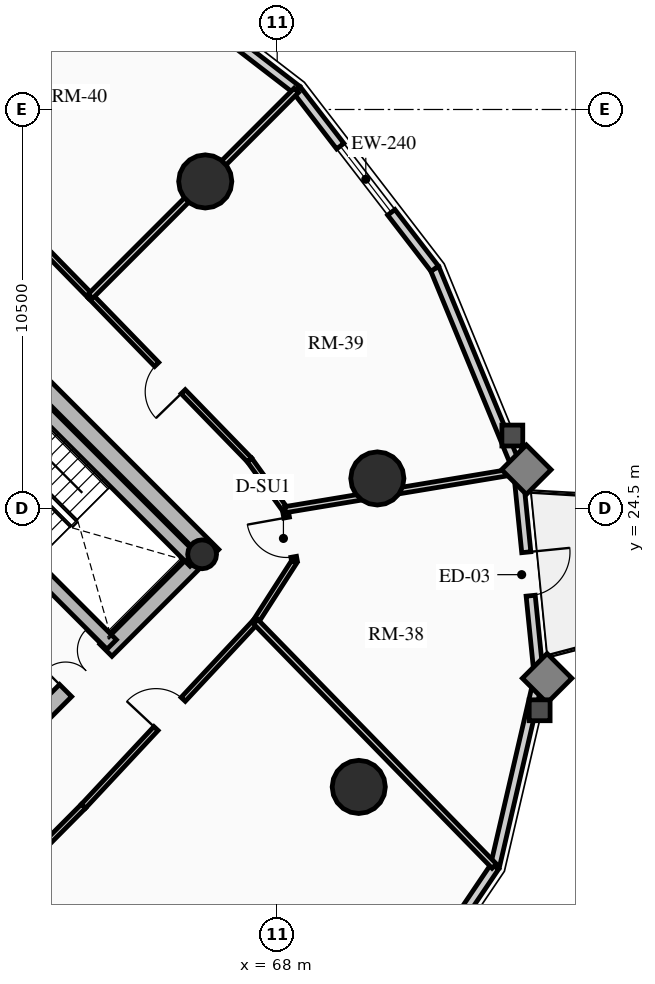
"""IFC4 building model, lengths in metres.
Left out: names, types, materials, properties, quantities, classifications, styles, units other than length and angle.
Written with IfcOpenShell. Run it as: python <this file> out.ifc"""

import sys

from ifc_helpers import new_model, si_unit, direction, frame, frame_2d, origin, origin_2d, place, context, subcontext, project, spatial, rectangle, circle, hollow_circle, extrude, source, transform, mapped, element, fill, save


model = new_model("IFC4")
c1 = context("Model", 3, precision=1e-05, world=origin(), true_north=direction((0.0, 1.0)))
c2 = subcontext(c1, "Body", "Model", "MODEL_VIEW")
j1 = project(units=[si_unit("LENGTHUNIT", "METRE"), si_unit("PLANEANGLEUNIT", "RADIAN")], contexts=[c1])
p1 = place(None, origin())
s1 = spatial("IfcSite", under=j1, at=p1, CompositionType="ELEMENT")
p2 = place(p1, origin())
s2 = spatial("IfcBuilding", under=s1, at=p2, CompositionType="ELEMENT")
p3 = place(p2, frame((0.0, 0.0, 84.7)))
s3 = spatial("IfcBuildingStorey", under=s2, at=p3, CompositionType="ELEMENT", Elevation=84.7)
p4 = place(p3, frame((66.303, 23.263, 0.0), z_axis=(0.0, 0.0, 1.0), x_axis=(-0.707106781187, 0.707106781187, 0.0)))
e1 = element("IfcWall", 1, at=p4, inside=s3, PredefinedType="SHEAR", context=c2, shape_type="SweptSolid", body=[
    extrude(rectangle(XDim=14.2, YDim=0.45, at=frame_2d((7.1, 0.0))), origin(), (0.0, 0.0, 1.0), 2.91),
])
p5 = place(p3, frame((58.578, 15.856, 0.0), z_axis=(0.0, 0.0, 1.0), x_axis=(0.707106781187, 0.707106781187, 0.0)))
e2 = element("IfcWall", 2, at=p5, inside=s3, PredefinedType="SHEAR", context=c2, shape_type="SweptSolid", body=[
    extrude(rectangle(XDim=10.7, YDim=0.45, at=frame_2d((5.35, 0.0))), origin(), (0.0, 0.0, 1.0), 2.91),
])
m1 = source(origin(), c2, "Body", "SweptSolid", [
    extrude(rectangle(XDim=1.5, YDim=2.02, at=frame_2d((0.75, 1.01))), frame((0.0, 0.235, 0.0), z_axis=(0.0, -1.0, 0.0), x_axis=(1.0, 0.0, 0.0)), (0.0, 0.0, 1.0), 0.47),
])
p6 = place(p5, frame((5.45, 0.0, 0.0)))
e3 = element("IfcOpeningElement", 3, at=p6, cuts=e2, PredefinedType="OPENING", context=c2, shape_type="MappedRepresentation", body=[
    mapped(m1, transform((0.0, 0.0, 0.0), x_axis=(1.0, 0.0, 0.0), y_axis=(0.0, 1.0, 0.0), z_axis=(0.0, 0.0, 1.0), scale=1.0)),
])
p7 = place(p3, frame((63.645, 20.922, 0.0), z_axis=(0.0, 0.0, 1.0), x_axis=(-0.707106781187, 0.707106781187, 0.0)))
e4 = element("IfcWall", 4, at=p7, inside=s3, PredefinedType="SHEAR", context=c2, shape_type="SweptSolid", body=[
    extrude(rectangle(XDim=13.75, YDim=0.35, at=frame_2d((6.875, 0.0))), origin(), (0.0, 0.0, 1.0), 2.91),
])
m2 = source(origin(), c2, "Body", "SweptSolid", [
    extrude(rectangle(XDim=1.1, YDim=2.015, at=frame_2d((0.55, 1.007))), frame((0.0, 0.185, 0.0), z_axis=(0.0, -1.0, 0.0), x_axis=(1.0, 0.0, 0.0)), (0.0, 0.0, 1.0), 0.37),
])
p8 = place(p7, frame((10.0, 0.0, 0.0)))
e5 = element("IfcOpeningElement", 5, at=p8, cuts=e4, PredefinedType="OPENING", context=c2, shape_type="MappedRepresentation", body=[
    mapped(m2, transform((0.0, 0.0, 0.0), x_axis=(1.0, 0.0, 0.0), y_axis=(0.0, 1.0, 0.0), z_axis=(0.0, 0.0, 1.0), scale=1.0)),
])
p9 = place(p7, frame((12.0, 0.0, 0.0)))
e6 = element("IfcOpeningElement", 6, at=p9, cuts=e4, PredefinedType="OPENING", context=c2, shape_type="MappedRepresentation", body=[
    mapped(m2, transform((0.0, 0.0, 0.0), x_axis=(1.0, 0.0, 0.0), y_axis=(0.0, 1.0, 0.0), z_axis=(0.0, 0.0, 1.0), scale=1.0)),
])
m3 = source(origin(), c2, "Body", "SweptSolid", [
    extrude(rectangle(XDim=1.15, YDim=2.02, at=frame_2d((0.575, 1.01))), frame((0.0, 0.185, 0.0), z_axis=(0.0, -1.0, 0.0), x_axis=(1.0, 0.0, 0.0)), (0.0, 0.0, 1.0), 0.37),
])
p10 = place(p7, frame((5.305, 0.0, 0.0)))
e7 = element("IfcOpeningElement", 7, at=p10, cuts=e4, PredefinedType="OPENING", context=c2, shape_type="MappedRepresentation", body=[
    mapped(m3, transform((0.0, 0.0, 0.0), x_axis=(1.0, 0.0, 0.0), y_axis=(0.0, 1.0, 0.0), z_axis=(0.0, 0.0, 1.0), scale=1.0)),
])
p11 = place(p3, frame((65.83, 23.107, 0.0), z_axis=(0.0, 0.0, 1.0), x_axis=(-0.707088616009, 0.707124945897, 0.0)))
e8 = element("IfcWall", 8, at=p11, inside=s3, PredefinedType="SHEAR", context=c2, shape_type="SweptSolid", body=[
    extrude(rectangle(XDim=6.72, YDim=0.35, at=frame_2d((3.36, 0.0))), origin(), (0.0, 0.0, 1.0), 2.91),
])
p12 = place(p3, frame((66.024, 23.294, 0.0), z_axis=(0.0, 0.0, 1.0), x_axis=(0.707106781187, 0.707106781187, 0.0)))
e9 = element("IfcColumn", 9, at=p12, inside=s3, PredefinedType="COLUMN", context=c2, shape_type="SweptSolid", body=[
    extrude(hollow_circle(Radius=0.38, WallThickness=0.032, at=origin_2d()), origin(), (0.0, 0.0, 1.0), 2.91),
])
for number, where, z_axis, x_axis in (
    (10, (66.107, 33.107, 0.0), (0.0, 0.0, 1.0), (1.0, 0.0, 0.0)),
    (11, (70.146, 17.173, 0.0), (0.0, 0.0, 1.0), (1.0, 0.0, 0.0)),
    (12, (70.635, 25.291, 0.0), (0.0, 0.0, 1.0), (1.0, 0.0, 0.0)),
):
    element("IfcColumn", number, at=place(p3, frame(where, z_axis=z_axis, x_axis=x_axis)), inside=s3, PredefinedType="USERDEFINED", context=c2, shape_type="SweptSolid", body=[
        extrude(circle(Radius=0.7, at=origin_2d()), origin(), (0.0, 0.0, 1.0), 2.91),
    ])
p13 = place(p3, frame((63.811, 39.145, 0.0), z_axis=(0.0, 0.0, 1.0), x_axis=(0.791982052206, -0.61054437102, 0.0)))
e13 = element("IfcWall", 13, at=p13, inside=s3, PredefinedType="SOLIDWALL", context=c2, shape_type="SweptSolid", body=[
    extrude(rectangle(XDim=5.942, YDim=0.24, at=frame_2d((2.971, 0.0))), origin(), (0.0, 0.0, 1.0), 2.179),
])
p14 = place(p3, frame((73.729, 15.08, 0.0), z_axis=(0.0, 0.0, 1.0), x_axis=(-0.559572880421, -0.828781148131, 0.0)))
e14 = element("IfcWall", 14, at=p14, inside=s3, PredefinedType="SOLIDWALL", context=c2, shape_type="SweptSolid", body=[
    extrude(rectangle(XDim=4.905, YDim=0.24, at=frame_2d((2.452, 0.0))), origin(), (0.0, 0.0, 1.0), 2.179),
])
m4 = source(origin(), c2, "Body", "SweptSolid", [
    extrude(rectangle(XDim=1.9, YDim=1.35, at=frame_2d((0.95, 0.675))), frame((0.0, 0.13, 0.0), z_axis=(0.0, -1.0, 0.0), x_axis=(1.0, 0.0, 0.0)), (0.0, 0.0, 1.0), 0.26),
])
p15 = place(p14, frame((1.502, 0.0, 0.65)))
e15 = element("IfcOpeningElement", 15, at=p15, cuts=e14, PredefinedType="OPENING", context=c2, shape_type="MappedRepresentation", body=[
    mapped(m4, transform((0.0, 0.0, 0.0), x_axis=(1.0, 0.0, 0.0), y_axis=(0.0, 1.0, 0.0), z_axis=(0.0, 0.0, 1.0), scale=1.0)),
])
p16 = place(p3, frame((74.885, 20.067, 0.0), z_axis=(0.0, 0.0, 1.0), x_axis=(-0.225834725257, -0.974165631126, 0.0)))
e16 = element("IfcWall", 16, at=p16, inside=s3, PredefinedType="SOLIDWALL", context=c2, shape_type="SweptSolid", body=[
    extrude(rectangle(XDim=5.119, YDim=0.24, at=frame_2d((2.56, 0.0))), origin(), (0.0, 0.0, 1.0), 2.179),
])
p17 = place(p3, frame((74.339, 25.487, 0.0), z_axis=(0.0, 0.0, 1.0), x_axis=(0.10015591906, -0.994971754311, 0.0)))
e17 = element("IfcWall", 17, at=p17, inside=s3, PredefinedType="SOLIDWALL", context=c2, shape_type="SweptSolid", body=[
    extrude(rectangle(XDim=5.448, YDim=0.24, at=frame_2d((2.724, 0.0))), origin(), (0.0, 0.0, 1.0), 2.179),
])
m5 = source(origin(), c2, "Body", "SweptSolid", [
    extrude(rectangle(XDim=1.15, YDim=2.005, at=frame_2d((0.575, 1.002))), frame((0.0, 0.13, 0.0), z_axis=(0.0, -1.0, 0.0), x_axis=(1.0, 0.0, 0.0)), (0.0, 0.0, 1.0), 0.26),
])
p18 = place(p17, frame((2.149, 0.0, 0.0)))
e18 = element("IfcOpeningElement", 18, at=p18, cuts=e17, PredefinedType="OPENING", context=c2, shape_type="MappedRepresentation", body=[
    mapped(m5, transform((0.0, 0.0, 0.0), x_axis=(1.0, 0.0, 0.0), y_axis=(0.0, 1.0, 0.0), z_axis=(0.0, 0.0, 1.0), scale=1.0)),
])
p19 = place(p3, frame((72.145, 30.811, 0.0), z_axis=(0.0, 0.0, 1.0), x_axis=(0.381027003055, -0.924563909604, 0.0)))
e19 = element("IfcWall", 19, at=p19, inside=s3, PredefinedType="SOLIDWALL", context=c2, shape_type="SweptSolid", body=[
    extrude(rectangle(XDim=5.758, YDim=0.24, at=frame_2d((2.879, 0.0))), origin(), (0.0, 0.0, 1.0), 2.179),
])
p20 = place(p3, frame((68.517, 35.517, 0.0), z_axis=(0.0, 0.0, 1.0), x_axis=(0.61054437102, -0.791982052206, 0.0)))
e20 = element("IfcWall", 20, at=p20, inside=s3, PredefinedType="SOLIDWALL", context=c2, shape_type="SweptSolid", body=[
    extrude(rectangle(XDim=5.942, YDim=0.24, at=frame_2d((2.971, 0.0))), origin(), (0.0, 0.0, 1.0), 2.179),
])
m6 = source(origin(), c2, "Body", "SweptSolid", [
    extrude(rectangle(XDim=2.2, YDim=1.35, at=frame_2d((1.1, 0.675))), frame((0.0, 0.13, 0.0), z_axis=(0.0, -1.0, 0.0), x_axis=(1.0, 0.0, 0.0)), (0.0, 0.0, 1.0), 0.26),
])
p21 = place(p20, frame((1.871, 0.0, 0.65)))
e21 = element("IfcOpeningElement", 21, at=p21, cuts=e20, PredefinedType="OPENING", context=c2, shape_type="MappedRepresentation", body=[
    mapped(m6, transform((0.0, 0.0, 0.0), x_axis=(1.0, 0.0, 0.0), y_axis=(0.0, 1.0, 0.0), z_axis=(0.0, 0.0, 1.0), scale=1.0)),
])
p22 = place(p3, frame((63.086, 30.086, 0.0), z_axis=(0.0, 0.0, 1.0), x_axis=(-0.699075897379, 0.715047473741, 0.0)))
e22 = element("IfcWall", 22, at=p22, inside=s3, PredefinedType="PARTITIONING", context=c2, shape_type="SweptSolid", body=[
    extrude(rectangle(XDim=6.114, YDim=0.15, at=frame_2d((3.057, 0.0))), origin(), (0.0, 0.0, 1.0), 2.225),
])
p23 = place(p3, frame((60.562, 14.31, 0.0), z_axis=(0.0, 0.0, 1.0), x_axis=(0.704566236161, 0.709638230975, 0.0)))
e23 = element("IfcWall", 23, at=p23, inside=s3, PredefinedType="PARTITIONING", context=c2, shape_type="SweptSolid", body=[
    extrude(rectangle(XDim=3.321, YDim=0.15, at=frame_2d((1.661, 0.0))), origin(), (0.0, 0.0, 1.0), 2.225),
])
p24 = place(p3, frame((62.903, 16.667, 0.0), z_axis=(0.0, 0.0, 1.0), x_axis=(0.682371947497, 0.731005147225, 0.0)))
e24 = element("IfcWall", 24, at=p24, inside=s3, PredefinedType="PARTITIONING", context=c2, shape_type="SweptSolid", body=[
    extrude(rectangle(XDim=6.642, YDim=0.15, at=frame_2d((3.321, 0.0))), origin(), (0.0, 0.0, 1.0), 2.225),
])
m7 = source(origin(), c2, "Body", "SweptSolid", [
    extrude(rectangle(XDim=1.05, YDim=2.015, at=frame_2d((0.525, 1.007))), frame((0.0, 0.085, 0.0), z_axis=(0.0, -1.0, 0.0), x_axis=(1.0, 0.0, 0.0)), (0.0, 0.0, 1.0), 0.17),
])
p25 = place(p24, frame((2.796, 0.0, 0.0)))
e25 = element("IfcOpeningElement", 25, at=p25, cuts=e24, PredefinedType="OPENING", context=c2, shape_type="MappedRepresentation", body=[
    mapped(m7, transform((0.0, 0.0, 0.0), x_axis=(1.0, 0.0, 0.0), y_axis=(0.0, 1.0, 0.0), z_axis=(0.0, 0.0, 1.0), scale=1.0)),
])
p26 = place(p3, frame((67.435, 21.521, 0.0), z_axis=(0.0, 0.0, 1.0), x_axis=(0.540777197838, 0.841165870859, 0.0)))
e26 = element("IfcWall", 26, at=p26, inside=s3, PredefinedType="PARTITIONING", context=c2, shape_type="SweptSolid", body=[
    extrude(rectangle(XDim=1.888, YDim=0.15, at=frame_2d((0.944, 0.0))), origin(), (0.0, 0.0, 1.0), 2.225),
])
p27 = place(p3, frame((68.456, 23.11, 0.0), z_axis=(0.0, 0.0, 1.0), x_axis=(-0.1772522795, 0.984165448191, 0.0)))
e27 = element("IfcWall", 27, at=p27, inside=s3, PredefinedType="PARTITIONING", context=c2, shape_type="SweptSolid", body=[
    extrude(rectangle(XDim=1.382, YDim=0.15, at=frame_2d((0.691, 0.0))), origin(), (0.0, 0.0, 1.0), 2.225),
])
p28 = place(p27, frame((0.12, 0.0, 0.0)))
e28 = element("IfcOpeningElement", 28, at=p28, cuts=e27, PredefinedType="OPENING", context=c2, shape_type="MappedRepresentation", body=[
    mapped(m7, transform((0.0, 0.0, 0.0), x_axis=(1.0, 0.0, 0.0), y_axis=(0.0, 1.0, 0.0), z_axis=(0.0, 0.0, 1.0), scale=1.0)),
])
p29 = place(p3, frame((68.211, 24.469, 0.0), z_axis=(0.0, 0.0, 1.0), x_axis=(-0.583012141368, 0.812463441034, 0.0)))
e29 = element("IfcWall", 29, at=p29, inside=s3, PredefinedType="PARTITIONING", context=c2, shape_type="SweptSolid", body=[
    extrude(rectangle(XDim=1.613, YDim=0.15, at=frame_2d((0.807, 0.0))), origin(), (0.0, 0.0, 1.0), 2.225),
])
p30 = place(p3, frame((67.27, 25.78, 0.0), z_axis=(0.0, 0.0, 1.0), x_axis=(-0.696847842907, 0.717218992942, 0.0)))
e30 = element("IfcWall", 30, at=p30, inside=s3, PredefinedType="PARTITIONING", context=c2, shape_type="SweptSolid", body=[
    extrude(rectangle(XDim=6.004, YDim=0.15, at=frame_2d((3.002, 0.0))), origin(), (0.0, 0.0, 1.0), 2.655),
])
m8 = source(origin(), c2, "Body", "SweptSolid", [
    extrude(rectangle(XDim=1.0, YDim=2.015, at=frame_2d((0.5, 1.007))), frame((0.0, 0.085, 0.0), z_axis=(0.0, -1.0, 0.0), x_axis=(1.0, 0.0, 0.0)), (0.0, 0.0, 1.0), 0.17),
])
p31 = place(p30, frame((2.502, 0.0, 0.0)))
e31 = element("IfcOpeningElement", 31, at=p31, cuts=e30, PredefinedType="OPENING", context=c2, shape_type="MappedRepresentation", body=[
    mapped(m8, transform((0.0, 0.0, 0.0), x_axis=(1.0, 0.0, 0.0), y_axis=(0.0, 1.0, 0.0), z_axis=(0.0, 0.0, 1.0), scale=1.0)),
])
p32 = place(p3, frame((63.086, 30.086, 0.0), z_axis=(0.0, 0.0, 1.0), x_axis=(0.707106781187, 0.707106781187, 0.0)))
e32 = element("IfcWall", 32, at=p32, inside=s3, PredefinedType="PARTITIONING", context=c2, shape_type="SweptSolid", body=[
    extrude(rectangle(XDim=7.661, YDim=0.16, at=frame_2d((3.831, 0.0))), origin(), (0.0, 0.0, 1.0), 2.179),
])
p33 = place(p3, frame((60.562, 14.31, 0.0), z_axis=(0.0, 0.0, 1.0), x_axis=(0.725582293335, -0.688135404989, 0.0)))
e33 = element("IfcWall", 33, at=p33, inside=s3, PredefinedType="PARTITIONING", context=c2, shape_type="SweptSolid", body=[
    extrude(rectangle(XDim=8.749, YDim=0.16, at=frame_2d((4.375, 0.0))), origin(), (0.0, 0.0, 1.0), 2.179),
])
p34 = place(p3, frame((67.435, 21.521, 0.0), z_axis=(0.0, 0.0, 1.0), x_axis=(0.6983880073, -0.715719352302, 0.0)))
e34 = element("IfcWall", 34, at=p34, inside=s3, PredefinedType="PARTITIONING", context=c2, shape_type="SweptSolid", body=[
    extrude(rectangle(XDim=8.987, YDim=0.16, at=frame_2d((4.494, 0.0))), origin(), (0.0, 0.0, 1.0), 2.179),
])
p35 = place(p3, frame((68.211, 24.469, 0.0), z_axis=(0.0, 0.0, 1.0), x_axis=(0.986479033329, 0.163887512651, 0.0)))
e35 = element("IfcWall", 35, at=p35, inside=s3, PredefinedType="PARTITIONING", context=c2, shape_type="SweptSolid", body=[
    extrude(rectangle(XDim=6.193, YDim=0.16, at=frame_2d((3.096, 0.0))), origin(), (0.0, 0.0, 1.0), 2.179),
])
m9 = source(origin(), c2, "Body", "SweptSolid", [
    extrude(rectangle(XDim=1.15, YDim=2.005, at=frame_2d((0.575, 1.002))), frame((0.0, 0.025, 0.0), z_axis=(0.0, -1.0, 0.0), x_axis=(1.0, 0.0, 0.0)), (0.0, 0.0, 1.0), 0.05),
])
p36 = place(p18, origin())
e36 = element("IfcDoor", 36, at=p36, inside=s3, OperationType="SINGLE_SWING_LEFT", PredefinedType="DOOR", context=c2, shape_type="MappedRepresentation", body=[
    mapped(m9, transform((0.0, 0.0, 0.0), x_axis=(1.0, 0.0, 0.0), y_axis=(0.0, 1.0, 0.0), z_axis=(0.0, 0.0, 1.0), scale=1.0)),
])
fill(e18, e36)
m10 = source(origin(), c2, "Body", "SweptSolid", [
    extrude(rectangle(XDim=2.2, YDim=1.35, at=frame_2d((1.1, 0.675))), frame((0.0, 0.03, 0.0), z_axis=(0.0, -1.0, 0.0), x_axis=(1.0, 0.0, 0.0)), (0.0, 0.0, 1.0), 0.06),
])
p37 = place(p21, origin())
e37 = element("IfcWindow", 37, at=p37, inside=s3, PartitioningType="DOUBLE_PANEL_VERTICAL", PredefinedType="WINDOW", context=c2, shape_type="MappedRepresentation", body=[
    mapped(m10, transform((0.0, 0.0, 0.0), x_axis=(1.0, 0.0, 0.0), y_axis=(0.0, 1.0, 0.0), z_axis=(0.0, 0.0, 1.0), scale=1.0)),
])
fill(e21, e37)
m11 = source(origin(), c2, "Body", "SweptSolid", [
    extrude(rectangle(XDim=1.5, YDim=2.02, at=frame_2d((0.75, 1.01))), frame((0.0, 0.025, 0.0), z_axis=(0.0, -1.0, 0.0), x_axis=(1.0, 0.0, 0.0)), (0.0, 0.0, 1.0), 0.05),
])
p38 = place(p6, origin())
e38 = element("IfcDoor", 38, at=p38, inside=s3, OperationType="DOUBLE_DOOR_SINGLE_SWING", PredefinedType="DOOR", context=c2, shape_type="MappedRepresentation", body=[
    mapped(m11, transform((0.0, 0.0, 0.0), x_axis=(1.0, 0.0, 0.0), y_axis=(0.0, 1.0, 0.0), z_axis=(0.0, 0.0, 1.0), scale=1.0)),
])
fill(e3, e38)
m12 = source(origin(), c2, "Body", "SweptSolid", [
    extrude(rectangle(XDim=1.05, YDim=2.015, at=frame_2d((0.525, 1.007))), frame((0.0, 0.025, 0.0), z_axis=(0.0, -1.0, 0.0), x_axis=(1.0, 0.0, 0.0)), (0.0, 0.0, 1.0), 0.05),
])
p39 = place(p25, origin())
e39 = element("IfcDoor", 39, at=p39, inside=s3, OperationType="SINGLE_SWING_LEFT", PredefinedType="DOOR", context=c2, shape_type="MappedRepresentation", body=[
    mapped(m12, transform((0.0, 0.0, 0.0), x_axis=(1.0, 0.0, 0.0), y_axis=(0.0, 1.0, 0.0), z_axis=(0.0, 0.0, 1.0), scale=1.0)),
])
fill(e25, e39)
p40 = place(p28, origin())
e40 = element("IfcDoor", 40, at=p40, inside=s3, OperationType="SINGLE_SWING_RIGHT", PredefinedType="DOOR", context=c2, shape_type="MappedRepresentation", body=[
    mapped(m12, transform((0.0, 0.0, 0.0), x_axis=(1.0, 0.0, 0.0), y_axis=(0.0, 1.0, 0.0), z_axis=(0.0, 0.0, 1.0), scale=1.0)),
])
fill(e28, e40)
m13 = source(origin(), c2, "Body", "SweptSolid", [
    extrude(rectangle(XDim=1.0, YDim=2.015, at=frame_2d((0.5, 1.007))), frame((0.0, 0.025, 0.0), z_axis=(0.0, -1.0, 0.0), x_axis=(1.0, 0.0, 0.0)), (0.0, 0.0, 1.0), 0.05),
])
p41 = place(p31, origin())
e41 = element("IfcDoor", 41, at=p41, inside=s3, OperationType="SINGLE_SWING_LEFT", PredefinedType="DOOR", context=c2, shape_type="MappedRepresentation", body=[
    mapped(m13, transform((0.0, 0.0, 0.0), x_axis=(1.0, 0.0, 0.0), y_axis=(0.0, 1.0, 0.0), z_axis=(0.0, 0.0, 1.0), scale=1.0)),
])
fill(e31, e41)
save(model, sys.argv[1])
